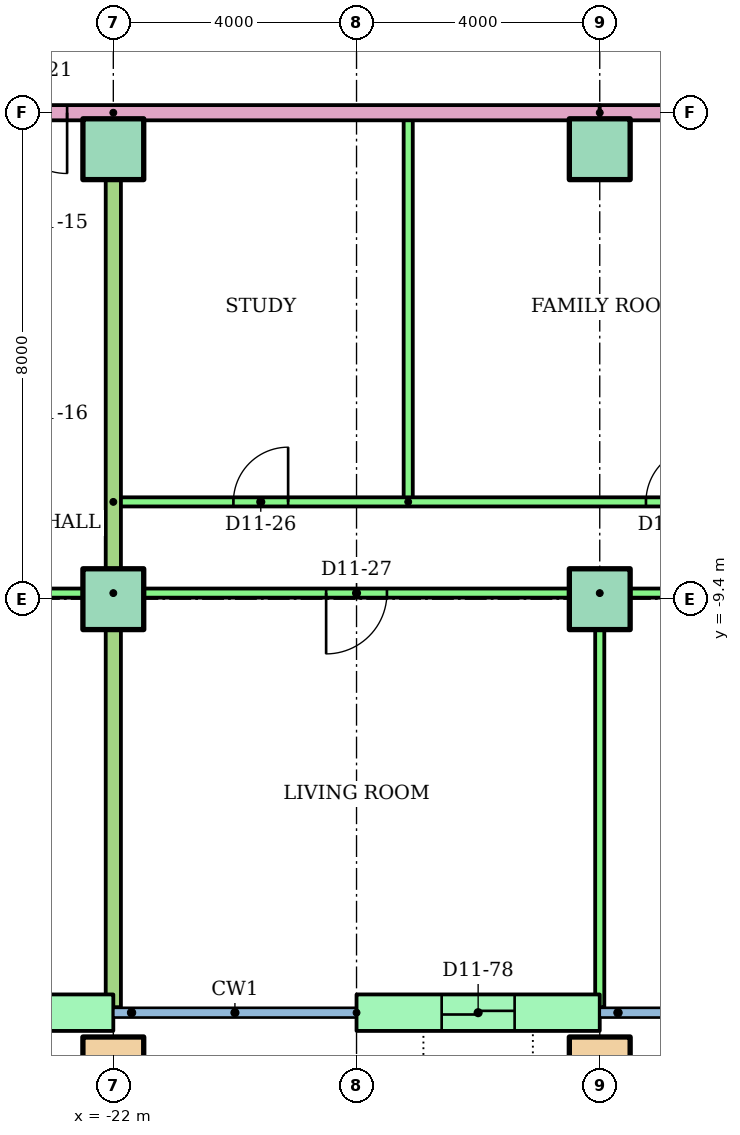
"""IFC4 building model, lengths in metres.
Left out: names, types, materials, properties, quantities, classifications, styles, units other than length and angle.
Written with IfcOpenShell. Run it as: python <this file> out.ifc"""

import sys

from ifc_helpers import new_model, si_unit, direction, frame, frame_2d, origin, origin_2d, place, context, subcontext, project, spatial, rectangle, hollow_rectangle, extrude, element, fill, save


model = new_model("IFC4")
c1 = context("Model", 3, precision=1e-05, world=origin(), true_north=direction((0.0, 1.0)))
c2 = subcontext(c1, "Body", "Model", "MODEL_VIEW")
j1 = project(units=[si_unit("LENGTHUNIT", "METRE"), si_unit("PLANEANGLEUNIT", "RADIAN")], contexts=[c1])
p1 = place(None, origin())
s1 = spatial("IfcSite", under=j1, at=p1, CompositionType="ELEMENT")
p2 = place(p1, origin())
s2 = spatial("IfcBuilding", under=s1, at=p2, CompositionType="ELEMENT")
p3 = place(p2, frame((0.0, 0.0, 44.8)))
s3 = spatial("IfcBuildingStorey", under=s2, at=p3, CompositionType="ELEMENT", Elevation=44.8)
for number, where in (
    (1, (-22.0, -17.1, 0.0)),
    (2, (-14.0, -17.1, 0.0)),
):
    element("IfcColumn", number, at=place(p3, frame(where)), inside=s3, PredefinedType="COLUMN", context=c2, shape_type="SweptSolid", body=[
        extrude(hollow_rectangle(XDim=1.0, YDim=1.0, WallThickness=0.05, at=origin_2d()), origin(), (0.0, 0.0, 1.0), 3.2),
    ])
for number, where in (
    (3, (-22.0, -9.4, 0.0)),
    (4, (-14.0, -9.4, 0.0)),
    (5, (-22.0, -2.0, 0.0)),
    (6, (-14.0, -2.0, 0.0)),
):
    element("IfcColumn", number, at=place(p3, frame(where)), inside=s3, PredefinedType="COLUMN", context=c2, shape_type="SweptSolid", body=[
        extrude(rectangle(XDim=1.0, YDim=1.0, at=origin_2d()), origin(), (0.0, 0.0, 1.0), 3.2),
    ])
p4 = place(p3, frame((-26.0, -16.2, 0.0)))
e7 = element("IfcWall", 7, at=p4, inside=s3, PredefinedType="STANDARD", context=c2, shape_type="SweptSolid", body=[
    extrude(rectangle(XDim=4.0, YDim=0.6, at=frame_2d((2.0, 0.0))), origin(), (0.0, 0.0, 1.0), 2.92),
])
p5 = place(p4, frame((1.4, 0.0, 0.0)))
e8 = element("IfcOpeningElement", 8, at=p5, cuts=e7, PredefinedType="OPENING", context=c2, shape_type="SweptSolid", body=[
    extrude(rectangle(XDim=1.2, YDim=2.1, at=frame_2d((0.6, 1.05))), frame((0.0, 0.31, 0.0), z_axis=(0.0, -1.0, 0.0), x_axis=(1.0, 0.0, 0.0)), (0.0, 0.0, 1.0), 0.62),
])
p6 = place(p3, frame((-18.0, -16.2, 0.0)))
e9 = element("IfcWall", 9, at=p6, inside=s3, PredefinedType="STANDARD", context=c2, shape_type="SweptSolid", body=[
    extrude(rectangle(XDim=4.0, YDim=0.6, at=frame_2d((2.0, 0.0))), origin(), (0.0, 0.0, 1.0), 2.92),
])
p7 = place(p6, frame((1.4, 0.0, 0.0)))
e10 = element("IfcOpeningElement", 10, at=p7, cuts=e9, PredefinedType="OPENING", context=c2, shape_type="SweptSolid", body=[
    extrude(rectangle(XDim=1.2, YDim=2.1, at=frame_2d((0.6, 1.05))), frame((0.0, 0.31, 0.0), z_axis=(0.0, -1.0, 0.0), x_axis=(1.0, 0.0, 0.0)), (0.0, 0.0, 1.0), 0.62),
])
p8 = place(p3, frame((-22.0, -9.3, 0.0), z_axis=(0.0, 0.0, 1.0), x_axis=(-1.0, 0.0, 0.0)))
e11 = element("IfcWall", 11, at=p8, inside=s3, PredefinedType="PARTITIONING", context=c2, shape_type="SweptSolid", body=[
    extrude(rectangle(XDim=14.51, YDim=0.15, at=frame_2d((7.255, 0.0))), origin(), (0.0, 0.0, 1.0), 2.4),
])
p9 = place(p8, frame((11.6, 0.0, 0.0)))
e12 = element("IfcOpeningElement", 12, at=p9, cuts=e11, PredefinedType="OPENING", context=c2, shape_type="SweptSolid", body=[
    extrude(rectangle(XDim=0.9, YDim=2.1, at=frame_2d((0.45, 1.05))), frame((0.0, 0.085, 0.0), z_axis=(0.0, -1.0, 0.0), x_axis=(1.0, 0.0, 0.0)), (0.0, 0.0, 1.0), 0.17),
])
p10 = place(p8, frame((4.4, 0.0, 0.0)))
e13 = element("IfcOpeningElement", 13, at=p10, cuts=e11, PredefinedType="OPENING", context=c2, shape_type="SweptSolid", body=[
    extrude(rectangle(XDim=1.0, YDim=2.1, at=frame_2d((0.5, 1.05))), frame((0.0, 0.085, 0.0), z_axis=(0.0, -1.0, 0.0), x_axis=(1.0, 0.0, 0.0)), (0.0, 0.0, 1.0), 0.17),
])
p11 = place(p3, frame((-17.15, -7.8, 0.0), z_axis=(0.0, 0.0, 1.0), x_axis=(0.0, 1.0, 0.0)))
e14 = element("IfcWall", 14, at=p11, inside=s3, PredefinedType="PARTITIONING", context=c2, shape_type="SweptSolid", body=[
    extrude(rectangle(XDim=6.4, YDim=0.15, at=frame_2d((3.2, 0.0))), origin(), (0.0, 0.0, 1.0), 2.4),
])
p12 = place(p3, frame((-22.0, -7.8, 0.0)))
e15 = element("IfcWall", 15, at=p12, inside=s3, PredefinedType="PARTITIONING", context=c2, shape_type="SweptSolid", body=[
    extrude(rectangle(XDim=22.0, YDim=0.15, at=frame_2d((11.0, 0.0))), origin(), (0.0, 0.0, 1.0), 2.4),
])
p13 = place(p12, frame((14.34, 0.0, 0.0)))
e16 = element("IfcOpeningElement", 16, at=p13, cuts=e15, PredefinedType="OPENING", context=c2, shape_type="SweptSolid", body=[
    extrude(rectangle(XDim=0.9, YDim=2.1, at=frame_2d((0.45, 1.05))), frame((0.0, 0.085, 0.0), z_axis=(0.0, -1.0, 0.0), x_axis=(1.0, 0.0, 0.0)), (0.0, 0.0, 1.0), 0.17),
])
p14 = place(p12, frame((8.76, 0.0, 0.0)))
e17 = element("IfcOpeningElement", 17, at=p14, cuts=e15, PredefinedType="OPENING", context=c2, shape_type="SweptSolid", body=[
    extrude(rectangle(XDim=0.9, YDim=2.1, at=frame_2d((0.45, 1.05))), frame((0.0, 0.085, 0.0), z_axis=(0.0, -1.0, 0.0), x_axis=(1.0, 0.0, 0.0)), (0.0, 0.0, 1.0), 0.17),
])
p15 = place(p12, frame((1.975, 0.0, 0.0)))
e18 = element("IfcOpeningElement", 18, at=p15, cuts=e15, PredefinedType="OPENING", context=c2, shape_type="SweptSolid", body=[
    extrude(rectangle(XDim=0.9, YDim=2.1, at=frame_2d((0.45, 1.05))), frame((0.0, 0.085, 0.0), z_axis=(0.0, -1.0, 0.0), x_axis=(1.0, 0.0, 0.0)), (0.0, 0.0, 1.0), 0.17),
])
p16 = place(p3, frame((2.0, -9.3, 0.0), z_axis=(0.0, 0.0, 1.0), x_axis=(-1.0, 0.0, 0.0)))
e19 = element("IfcWall", 19, at=p16, inside=s3, PredefinedType="PARTITIONING", context=c2, shape_type="SweptSolid", body=[
    extrude(rectangle(XDim=24.0, YDim=0.15, at=frame_2d((12.0, 0.0))), origin(), (0.0, 0.0, 1.0), 2.4),
])
p17 = place(p16, frame((19.5, 0.0, 0.0)))
e20 = element("IfcOpeningElement", 20, at=p17, cuts=e19, PredefinedType="OPENING", context=c2, shape_type="SweptSolid", body=[
    extrude(rectangle(XDim=1.0, YDim=2.1, at=frame_2d((0.5, 1.05))), frame((0.0, 0.085, 0.0), z_axis=(0.0, -1.0, 0.0), x_axis=(1.0, 0.0, 0.0)), (0.0, 0.0, 1.0), 0.17),
])
p18 = place(p16, frame((13.55, 0.0, 0.0)))
e21 = element("IfcOpeningElement", 21, at=p18, cuts=e19, PredefinedType="OPENING", context=c2, shape_type="SweptSolid", body=[
    extrude(rectangle(XDim=0.9, YDim=2.1, at=frame_2d((0.45, 1.05))), frame((0.0, 0.085, 0.0), z_axis=(0.0, -1.0, 0.0), x_axis=(1.0, 0.0, 0.0)), (0.0, 0.0, 1.0), 0.17),
])
p19 = place(p16, frame((9.55, 0.0, 0.0)))
e22 = element("IfcOpeningElement", 22, at=p19, cuts=e19, PredefinedType="OPENING", context=c2, shape_type="SweptSolid", body=[
    extrude(rectangle(XDim=0.9, YDim=2.1, at=frame_2d((0.45, 1.05))), frame((0.0, 0.085, 0.0), z_axis=(0.0, -1.0, 0.0), x_axis=(1.0, 0.0, 0.0)), (0.0, 0.0, 1.0), 0.17),
])
p20 = place(p16, frame((5.55, 0.0, 0.0)))
e23 = element("IfcOpeningElement", 23, at=p20, cuts=e19, PredefinedType="OPENING", context=c2, shape_type="SweptSolid", body=[
    extrude(rectangle(XDim=0.9, YDim=2.1, at=frame_2d((0.45, 1.05))), frame((0.0, 0.085, 0.0), z_axis=(0.0, -1.0, 0.0), x_axis=(1.0, 0.0, 0.0)), (0.0, 0.0, 1.0), 0.17),
])
p21 = place(p16, frame((1.55, 0.0, 0.0)))
e24 = element("IfcOpeningElement", 24, at=p21, cuts=e19, PredefinedType="OPENING", context=c2, shape_type="SweptSolid", body=[
    extrude(rectangle(XDim=0.9, YDim=2.1, at=frame_2d((0.45, 1.05))), frame((0.0, 0.085, 0.0), z_axis=(0.0, -1.0, 0.0), x_axis=(1.0, 0.0, 0.0)), (0.0, 0.0, 1.0), 0.17),
])
p22 = place(p3, frame((-14.0, -9.3, 0.0), z_axis=(0.0, 0.0, 1.0), x_axis=(0.0, -1.0, 0.0)))
e25 = element("IfcWall", 25, at=p22, inside=s3, PredefinedType="PARTITIONING", context=c2, shape_type="SweptSolid", body=[
    extrude(rectangle(XDim=6.81, YDim=0.15, at=frame_2d((3.405, 0.0))), origin(), (0.0, 0.0, 1.0), 2.4),
])
p23 = place(p3, frame((-22.0, -1.4, 0.0), z_axis=(0.0, 0.0, 1.0), x_axis=(0.0, -1.0, 0.0)))
e26 = element("IfcWall", 26, at=p23, inside=s3, PredefinedType="PARTITIONING", context=c2, shape_type="SweptSolid", body=[
    extrude(rectangle(XDim=14.71, YDim=0.25, at=frame_2d((7.355, 0.0))), origin(), (0.0, 0.0, 1.0), 2.4),
])
p24 = place(p3, frame((-14.0, -1.4, 0.0), z_axis=(0.0, 0.0, 1.0), x_axis=(-1.0, 0.0, 0.0)))
e27 = element("IfcWall", 27, at=p24, inside=s3, PredefinedType="PARTITIONING", context=c2, shape_type="SweptSolid", body=[
    extrude(rectangle(XDim=15.0, YDim=0.25, at=frame_2d((7.5, 0.0))), origin(), (0.0, 0.0, 1.0), 2.4),
])
p25 = place(p24, frame((8.76, 0.0, 0.0)))
e28 = element("IfcOpeningElement", 28, at=p25, cuts=e27, PredefinedType="OPENING", context=c2, shape_type="SweptSolid", body=[
    extrude(rectangle(XDim=1.0, YDim=2.1, at=frame_2d((0.5, 1.05))), frame((0.0, 0.135, 0.0), z_axis=(0.0, -1.0, 0.0), x_axis=(1.0, 0.0, 0.0)), (0.0, 0.0, 1.0), 0.27),
])
p26 = place(p3, frame((14.0, -1.4, 0.0), z_axis=(0.0, 0.0, 1.0), x_axis=(-1.0, 0.0, 0.0)))
e29 = element("IfcWall", 29, at=p26, inside=s3, PredefinedType="PARTITIONING", context=c2, shape_type="SweptSolid", body=[
    extrude(rectangle(XDim=28.0, YDim=0.25, at=frame_2d((14.0, 0.0))), origin(), (0.0, 0.0, 1.0), 2.4),
])
p27 = place(p26, frame((12.76, 0.0, 0.0)))
e30 = element("IfcOpeningElement", 30, at=p27, cuts=e29, PredefinedType="OPENING", context=c2, shape_type="SweptSolid", body=[
    extrude(rectangle(XDim=1.0, YDim=2.1, at=frame_2d((0.5, 1.05))), frame((0.0, 0.135, 0.0), z_axis=(0.0, -1.0, 0.0), x_axis=(1.0, 0.0, 0.0)), (0.0, 0.0, 1.0), 0.27),
])
p28 = place(p26, frame((10.24, 0.0, 0.0)))
e31 = element("IfcOpeningElement", 31, at=p28, cuts=e29, PredefinedType="OPENING", context=c2, shape_type="SweptSolid", body=[
    extrude(rectangle(XDim=1.0, YDim=2.1, at=frame_2d((0.5, 1.05))), frame((0.0, 0.135, 0.0), z_axis=(0.0, -1.0, 0.0), x_axis=(1.0, 0.0, 0.0)), (0.0, 0.0, 1.0), 0.27),
])
p29 = place(p25, origin())
e32 = element("IfcDoor", 32, at=p29, inside=s3, OperationType="SINGLE_SWING_LEFT", PredefinedType="DOOR", context=c2, shape_type="SweptSolid", body=[
    extrude(rectangle(XDim=1.0, YDim=2.1, at=frame_2d((0.5, 1.05))), frame((0.0, 0.025, 0.0), z_axis=(0.0, -1.0, 0.0), x_axis=(1.0, 0.0, 0.0)), (0.0, 0.0, 1.0), 0.05),
])
fill(e28, e32)
p30 = place(p14, origin())
e33 = element("IfcDoor", 33, at=p30, inside=s3, OperationType="SINGLE_SWING_RIGHT", PredefinedType="DOOR", context=c2, shape_type="SweptSolid", body=[
    extrude(rectangle(XDim=0.9, YDim=2.1, at=frame_2d((0.45, 1.05))), frame((0.0, 0.025, 0.0), z_axis=(0.0, -1.0, 0.0), x_axis=(1.0, 0.0, 0.0)), (0.0, 0.0, 1.0), 0.05),
])
fill(e17, e33)
p31 = place(p15, origin())
e34 = element("IfcDoor", 34, at=p31, inside=s3, OperationType="SINGLE_SWING_RIGHT", PredefinedType="DOOR", context=c2, shape_type="SweptSolid", body=[
    extrude(rectangle(XDim=0.9, YDim=2.1, at=frame_2d((0.45, 1.05))), frame((0.0, 0.025, 0.0), z_axis=(0.0, -1.0, 0.0), x_axis=(1.0, 0.0, 0.0)), (0.0, 0.0, 1.0), 0.05),
])
fill(e18, e34)
p32 = place(p17, origin())
e35 = element("IfcDoor", 35, at=p32, inside=s3, OperationType="SINGLE_SWING_RIGHT", PredefinedType="DOOR", context=c2, shape_type="SweptSolid", body=[
    extrude(rectangle(XDim=1.0, YDim=2.1, at=frame_2d((0.5, 1.05))), frame((0.0, 0.025, 0.0), z_axis=(0.0, -1.0, 0.0), x_axis=(1.0, 0.0, 0.0)), (0.0, 0.0, 1.0), 0.05),
])
fill(e20, e35)
p33 = place(p7, origin())
e36 = element("IfcDoor", 36, at=p33, inside=s3, OperationType="SLIDING_TO_LEFT", PredefinedType="DOOR", context=c2, shape_type="SweptSolid", body=[
    extrude(rectangle(XDim=1.2, YDim=2.1, at=frame_2d((0.6, 1.05))), frame((0.0, 0.025, 0.0), z_axis=(0.0, -1.0, 0.0), x_axis=(1.0, 0.0, 0.0)), (0.0, 0.0, 1.0), 0.05),
])
fill(e10, e36)
save(model, sys.argv[1])
